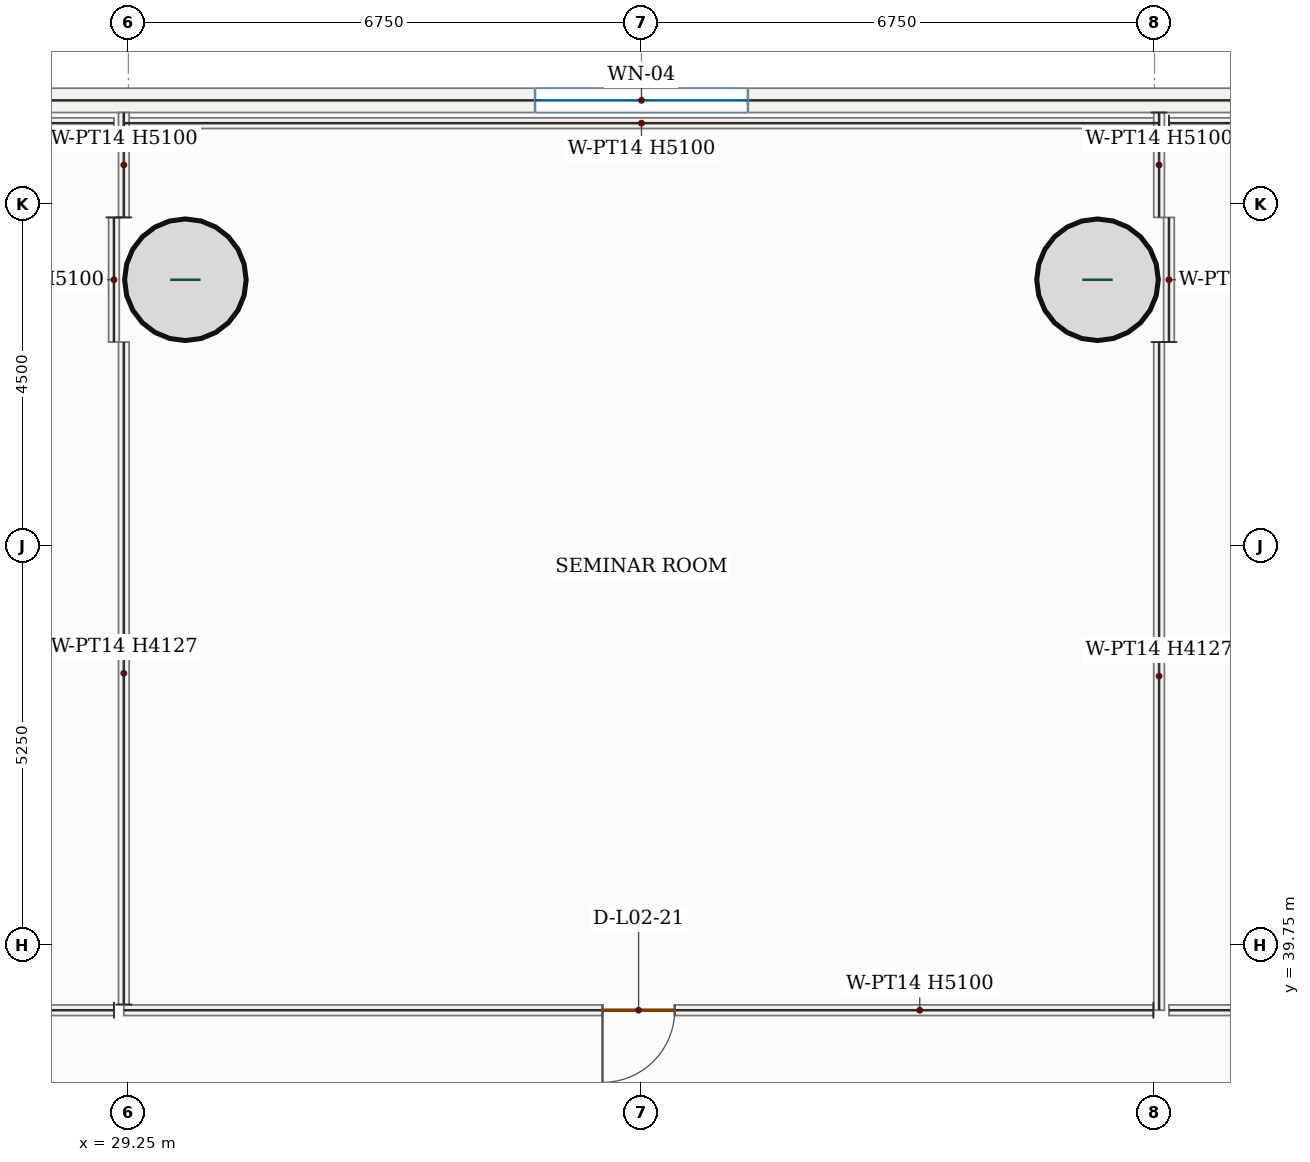
"""IFC4 building model, lengths in metres.
Left out: names, types, materials, properties, quantities, classifications, styles, units other than length and angle.
Written with IfcOpenShell. Run it as: python <this file> out.ifc"""

import sys

from ifc_helpers import new_model, si_unit, direction, frame, frame_2d, origin, origin_2d, place, context, subcontext, project, spatial, rectangle, hollow_circle, extrude, source, transform, mapped, element, fill, save


model = new_model("IFC4")
c1 = context("Model", 3, precision=1e-05, world=origin(), true_north=direction((0.0, 1.0)))
c2 = subcontext(c1, "Body", "Model", "MODEL_VIEW")
j1 = project(units=[si_unit("LENGTHUNIT", "METRE"), si_unit("PLANEANGLEUNIT", "RADIAN")], contexts=[c1])
p1 = place(None, origin())
s1 = spatial("IfcSite", under=j1, at=p1, CompositionType="ELEMENT")
p2 = place(p1, origin())
s2 = spatial("IfcBuilding", under=s1, at=p2, CompositionType="ELEMENT")
p3 = place(p2, frame((0.0, 0.0, 12.6)))
s3 = spatial("IfcBuildingStorey", under=s2, at=p3, CompositionType="ELEMENT", Elevation=12.6)
m1 = source(origin(), c2, "Body", "SweptSolid", [
    extrude(hollow_circle(Radius=0.8, WallThickness=0.06, at=origin_2d()), origin(), (0.0, 0.0, 1.0), 5.4),
])
for number, where, z_axis, x_axis in (
    (1, (30.0, 48.5, 0.0), (0.0, 0.0, 1.0), (1.0, 0.0, 0.0)),
    (2, (42.0, 48.5, 0.0), (0.0, 0.0, 1.0), (1.0, 0.0, 0.0)),
):
    element("IfcColumn", number, at=place(p3, frame(where, z_axis=z_axis, x_axis=x_axis)), inside=s3, PredefinedType="COLUMN", context=c2, shape_type="MappedRepresentation", body=[
        mapped(m1, transform((0.0, 0.0, 0.0), x_axis=(1.0, 0.0, 0.0), y_axis=(0.0, 1.0, 0.0), z_axis=(0.0, 0.0, 1.0), scale=1.0)),
    ])
p4 = place(p3, frame((4.84, 50.86, 0.0), z_axis=(0.0, 0.0, 1.0), x_axis=(1.0, 0.0, 0.0)))
e3 = element("IfcWall", 3, at=p4, inside=s3, PredefinedType="SOLIDWALL", context=c2, shape_type="SweptSolid", body=[
    extrude(rectangle(XDim=62.32, YDim=0.32, at=frame_2d((31.16, 0.0))), origin(), (0.0, 0.0, 1.0), 5.1),
])
p5 = place(p4, frame((29.76, 0.0, 0.85)))
e4 = element("IfcOpeningElement", 4, at=p5, cuts=e3, PredefinedType="OPENING", context=c2, shape_type="SweptSolid", body=[
    extrude(rectangle(XDim=2.8, YDim=2.4, at=frame_2d((1.4, 1.2))), frame((0.0, 0.17, 0.0), z_axis=(0.0, -1.0, 0.0), x_axis=(1.0, 0.0, 0.0)), (0.0, 0.0, 1.0), 0.34),
])
m2 = source(origin(), c2, "Body", "SweptSolid", [
    extrude(rectangle(XDim=13.62, YDim=0.14, at=frame_2d((6.81, 0.0))), origin(), (0.0, 0.0, 1.0), 5.1),
])
p6 = place(p3, frame((29.19, 50.56, 0.0), z_axis=(0.0, 0.0, 1.0), x_axis=(1.0, 0.0, 0.0)))
e5 = element("IfcWall", 5, at=p6, inside=s3, PredefinedType="PARTITIONING", context=c2, shape_type="MappedRepresentation", body=[
    mapped(m2, transform((0.0, 0.0, 0.0), x_axis=(1.0, 0.0, 0.0), y_axis=(0.0, 1.0, 0.0), z_axis=(0.0, 0.0, 1.0), scale=1.0)),
])
m3 = source(origin(), c2, "Body", "SweptSolid", [
    extrude(rectangle(XDim=1.38, YDim=0.14, at=frame_2d((0.69, 0.0))), origin(), (0.0, 0.0, 1.0), 5.1),
])
p7 = place(p3, frame((42.81, 50.7, 0.0), z_axis=(0.0, 0.0, 1.0), x_axis=(0.0, -1.0, 0.0)))
e6 = element("IfcWall", 6, at=p7, inside=s3, PredefinedType="PARTITIONING", context=c2, shape_type="MappedRepresentation", body=[
    mapped(m3, transform((0.0, 0.0, 0.0), x_axis=(1.0, 0.0, 0.0), y_axis=(0.0, 1.0, 0.0), z_axis=(0.0, 0.0, 1.0), scale=1.0)),
])
m4 = source(origin(), c2, "Body", "SweptSolid", [
    extrude(rectangle(XDim=8.79, YDim=0.14, at=frame_2d((4.395, 0.0))), origin(), (0.0, 0.0, 1.0), 4.127),
])
p8 = place(p3, frame((42.81, 47.68, 0.0), z_axis=(0.0, 0.0, 1.0), x_axis=(0.0, -1.0, 0.0)))
e7 = element("IfcWall", 7, at=p8, inside=s3, PredefinedType="PARTITIONING", context=c2, shape_type="MappedRepresentation", body=[
    mapped(m4, transform((0.0, 0.0, 0.0), x_axis=(1.0, 0.0, 0.0), y_axis=(0.0, 1.0, 0.0), z_axis=(0.0, 0.0, 1.0), scale=1.0)),
])
p9 = place(p3, frame((42.735, 38.89, 0.0), z_axis=(0.0, 0.0, 1.0), x_axis=(-1.0, 0.0, 0.0)))
e8 = element("IfcWall", 8, at=p9, inside=s3, PredefinedType="PARTITIONING", context=c2, shape_type="SweptSolid", body=[
    extrude(rectangle(XDim=13.545, YDim=0.14, at=frame_2d((6.772, 0.0))), origin(), (0.0, 0.0, 1.0), 5.1),
])
p10 = place(p9, frame((6.298, 0.0, 0.0)))
e9 = element("IfcOpeningElement", 9, at=p10, cuts=e8, PredefinedType="OPENING", context=c2, shape_type="SweptSolid", body=[
    extrude(rectangle(XDim=0.95, YDim=2.15, at=frame_2d((0.475, 1.075))), frame((0.0, 0.08, 0.0), z_axis=(0.0, -1.0, 0.0), x_axis=(1.0, 0.0, 0.0)), (0.0, 0.0, 1.0), 0.16),
])
m5 = source(origin(), c2, "Body", "SweptSolid", [
    extrude(rectangle(XDim=8.715, YDim=0.14, at=frame_2d((4.357, 0.0))), origin(), (0.0, 0.0, 1.0), 4.127),
])
p11 = place(p3, frame((29.19, 38.965, 0.0), z_axis=(0.0, 0.0, 1.0), x_axis=(0.0, 1.0, 0.0)))
e10 = element("IfcWall", 10, at=p11, inside=s3, PredefinedType="PARTITIONING", context=c2, shape_type="MappedRepresentation", body=[
    mapped(m5, transform((0.0, 0.0, 0.0), x_axis=(1.0, 0.0, 0.0), y_axis=(0.0, 1.0, 0.0), z_axis=(0.0, 0.0, 1.0), scale=1.0)),
])
p12 = place(p3, frame((29.19, 49.32, 0.0), z_axis=(0.0, 0.0, 1.0), x_axis=(0.0, 1.0, 0.0)))
e11 = element("IfcWall", 11, at=p12, inside=s3, PredefinedType="PARTITIONING", context=c2, shape_type="MappedRepresentation", body=[
    mapped(m3, transform((0.0, 0.0, 0.0), x_axis=(1.0, 0.0, 0.0), y_axis=(0.0, 1.0, 0.0), z_axis=(0.0, 0.0, 1.0), scale=1.0)),
])
m6 = source(origin(), c2, "Body", "SweptSolid", [
    extrude(rectangle(XDim=1.64, YDim=0.14, at=frame_2d((0.82, 0.0))), origin(), (0.0, 0.0, 1.0), 5.1),
])
p13 = place(p3, frame((29.06, 49.32, 0.0), z_axis=(0.0, 0.0, 1.0), x_axis=(0.0, -1.0, 0.0)))
e12 = element("IfcWall", 12, at=p13, inside=s3, PredefinedType="PARTITIONING", context=c2, shape_type="MappedRepresentation", body=[
    mapped(m6, transform((0.0, 0.0, 0.0), x_axis=(1.0, 0.0, 0.0), y_axis=(0.0, 1.0, 0.0), z_axis=(0.0, 0.0, 1.0), scale=1.0)),
])
m7 = source(origin(), c2, "Body", "SweptSolid", [
    extrude(rectangle(XDim=6.556, YDim=0.14, at=frame_2d((3.278, 0.0))), origin(), (0.0, 0.0, 1.0), 5.1),
])
p14 = place(p3, frame((29.06, 38.89, 0.0), z_axis=(0.0, 0.0, 1.0), x_axis=(-1.0, 0.0, 0.0)))
e13 = element("IfcWall", 13, at=p14, inside=s3, PredefinedType="PARTITIONING", context=c2, shape_type="MappedRepresentation", body=[
    mapped(m7, transform((0.0, 0.0, 0.0), x_axis=(1.0, 0.0, 0.0), y_axis=(0.0, 1.0, 0.0), z_axis=(0.0, 0.0, 1.0), scale=1.0)),
])
m8 = source(origin(), c2, "Body", "SweptSolid", [
    extrude(rectangle(XDim=10.49, YDim=0.14, at=frame_2d((5.245, 0.0))), origin(), (0.0, 0.0, 1.0), 5.1),
])
p15 = place(p3, frame((18.57, 50.56, 0.0), z_axis=(0.0, 0.0, 1.0), x_axis=(1.0, 0.0, 0.0)))
e14 = element("IfcWall", 14, at=p15, inside=s3, PredefinedType="PARTITIONING", context=c2, shape_type="MappedRepresentation", body=[
    mapped(m8, transform((0.0, 0.0, 0.0), x_axis=(1.0, 0.0, 0.0), y_axis=(0.0, 1.0, 0.0), z_axis=(0.0, 0.0, 1.0), scale=1.0)),
])
m9 = source(origin(), c2, "Body", "SweptSolid", [
    extrude(rectangle(XDim=6.554, YDim=0.14, at=frame_2d((3.277, 0.0))), origin(), (0.0, 0.0, 1.0), 5.1),
])
p16 = place(p3, frame((49.494, 38.89, 0.0), z_axis=(0.0, 0.0, 1.0), x_axis=(-1.0, 0.0, 0.0)))
e15 = element("IfcWall", 15, at=p16, inside=s3, PredefinedType="PARTITIONING", context=c2, shape_type="MappedRepresentation", body=[
    mapped(m9, transform((0.0, 0.0, 0.0), x_axis=(1.0, 0.0, 0.0), y_axis=(0.0, 1.0, 0.0), z_axis=(0.0, 0.0, 1.0), scale=1.0)),
])
p17 = place(p3, frame((42.94, 47.68, 0.0), z_axis=(0.0, 0.0, 1.0), x_axis=(0.0, 1.0, 0.0)))
e16 = element("IfcWall", 16, at=p17, inside=s3, PredefinedType="PARTITIONING", context=c2, shape_type="MappedRepresentation", body=[
    mapped(m6, transform((0.0, 0.0, 0.0), x_axis=(1.0, 0.0, 0.0), y_axis=(0.0, 1.0, 0.0), z_axis=(0.0, 0.0, 1.0), scale=1.0)),
])
p18 = place(p3, frame((42.94, 50.56, 0.0), z_axis=(0.0, 0.0, 1.0), x_axis=(1.0, 0.0, 0.0)))
e17 = element("IfcWall", 17, at=p18, inside=s3, PredefinedType="PARTITIONING", context=c2, shape_type="MappedRepresentation", body=[
    mapped(m8, transform((0.0, 0.0, 0.0), x_axis=(1.0, 0.0, 0.0), y_axis=(0.0, 1.0, 0.0), z_axis=(0.0, 0.0, 1.0), scale=1.0)),
])
m10 = source(origin(), c2, "Body", "SweptSolid", [
    extrude(rectangle(XDim=2.8, YDim=2.4, at=frame_2d((1.4, 1.2))), frame((0.0, 0.03, 0.0), z_axis=(0.0, -1.0, 0.0), x_axis=(1.0, 0.0, 0.0)), (0.0, 0.0, 1.0), 0.06),
])
p19 = place(p5, origin())
e18 = element("IfcWindow", 18, at=p19, inside=s3, PartitioningType="TRIPLE_PANEL_VERTICAL", PredefinedType="WINDOW", context=c2, shape_type="MappedRepresentation", body=[
    mapped(m10, transform((0.0, 0.0, 0.0), x_axis=(1.0, 0.0, 0.0), y_axis=(0.0, 1.0, 0.0), z_axis=(0.0, 0.0, 1.0), scale=1.0)),
])
fill(e4, e18)
m11 = source(origin(), c2, "Body", "SweptSolid", [
    extrude(rectangle(XDim=0.95, YDim=2.15, at=frame_2d((0.475, 1.075))), frame((0.0, 0.025, 0.0), z_axis=(0.0, -1.0, 0.0), x_axis=(1.0, 0.0, 0.0)), (0.0, 0.0, 1.0), 0.05),
])
p20 = place(p10, origin())
e19 = element("IfcDoor", 19, at=p20, inside=s3, OperationType="SINGLE_SWING_RIGHT", PredefinedType="DOOR", context=c2, shape_type="MappedRepresentation", body=[
    mapped(m11, transform((0.0, 0.0, 0.0), x_axis=(1.0, 0.0, 0.0), y_axis=(0.0, 1.0, 0.0), z_axis=(0.0, 0.0, 1.0), scale=1.0)),
])
fill(e9, e19)
save(model, sys.argv[1])
